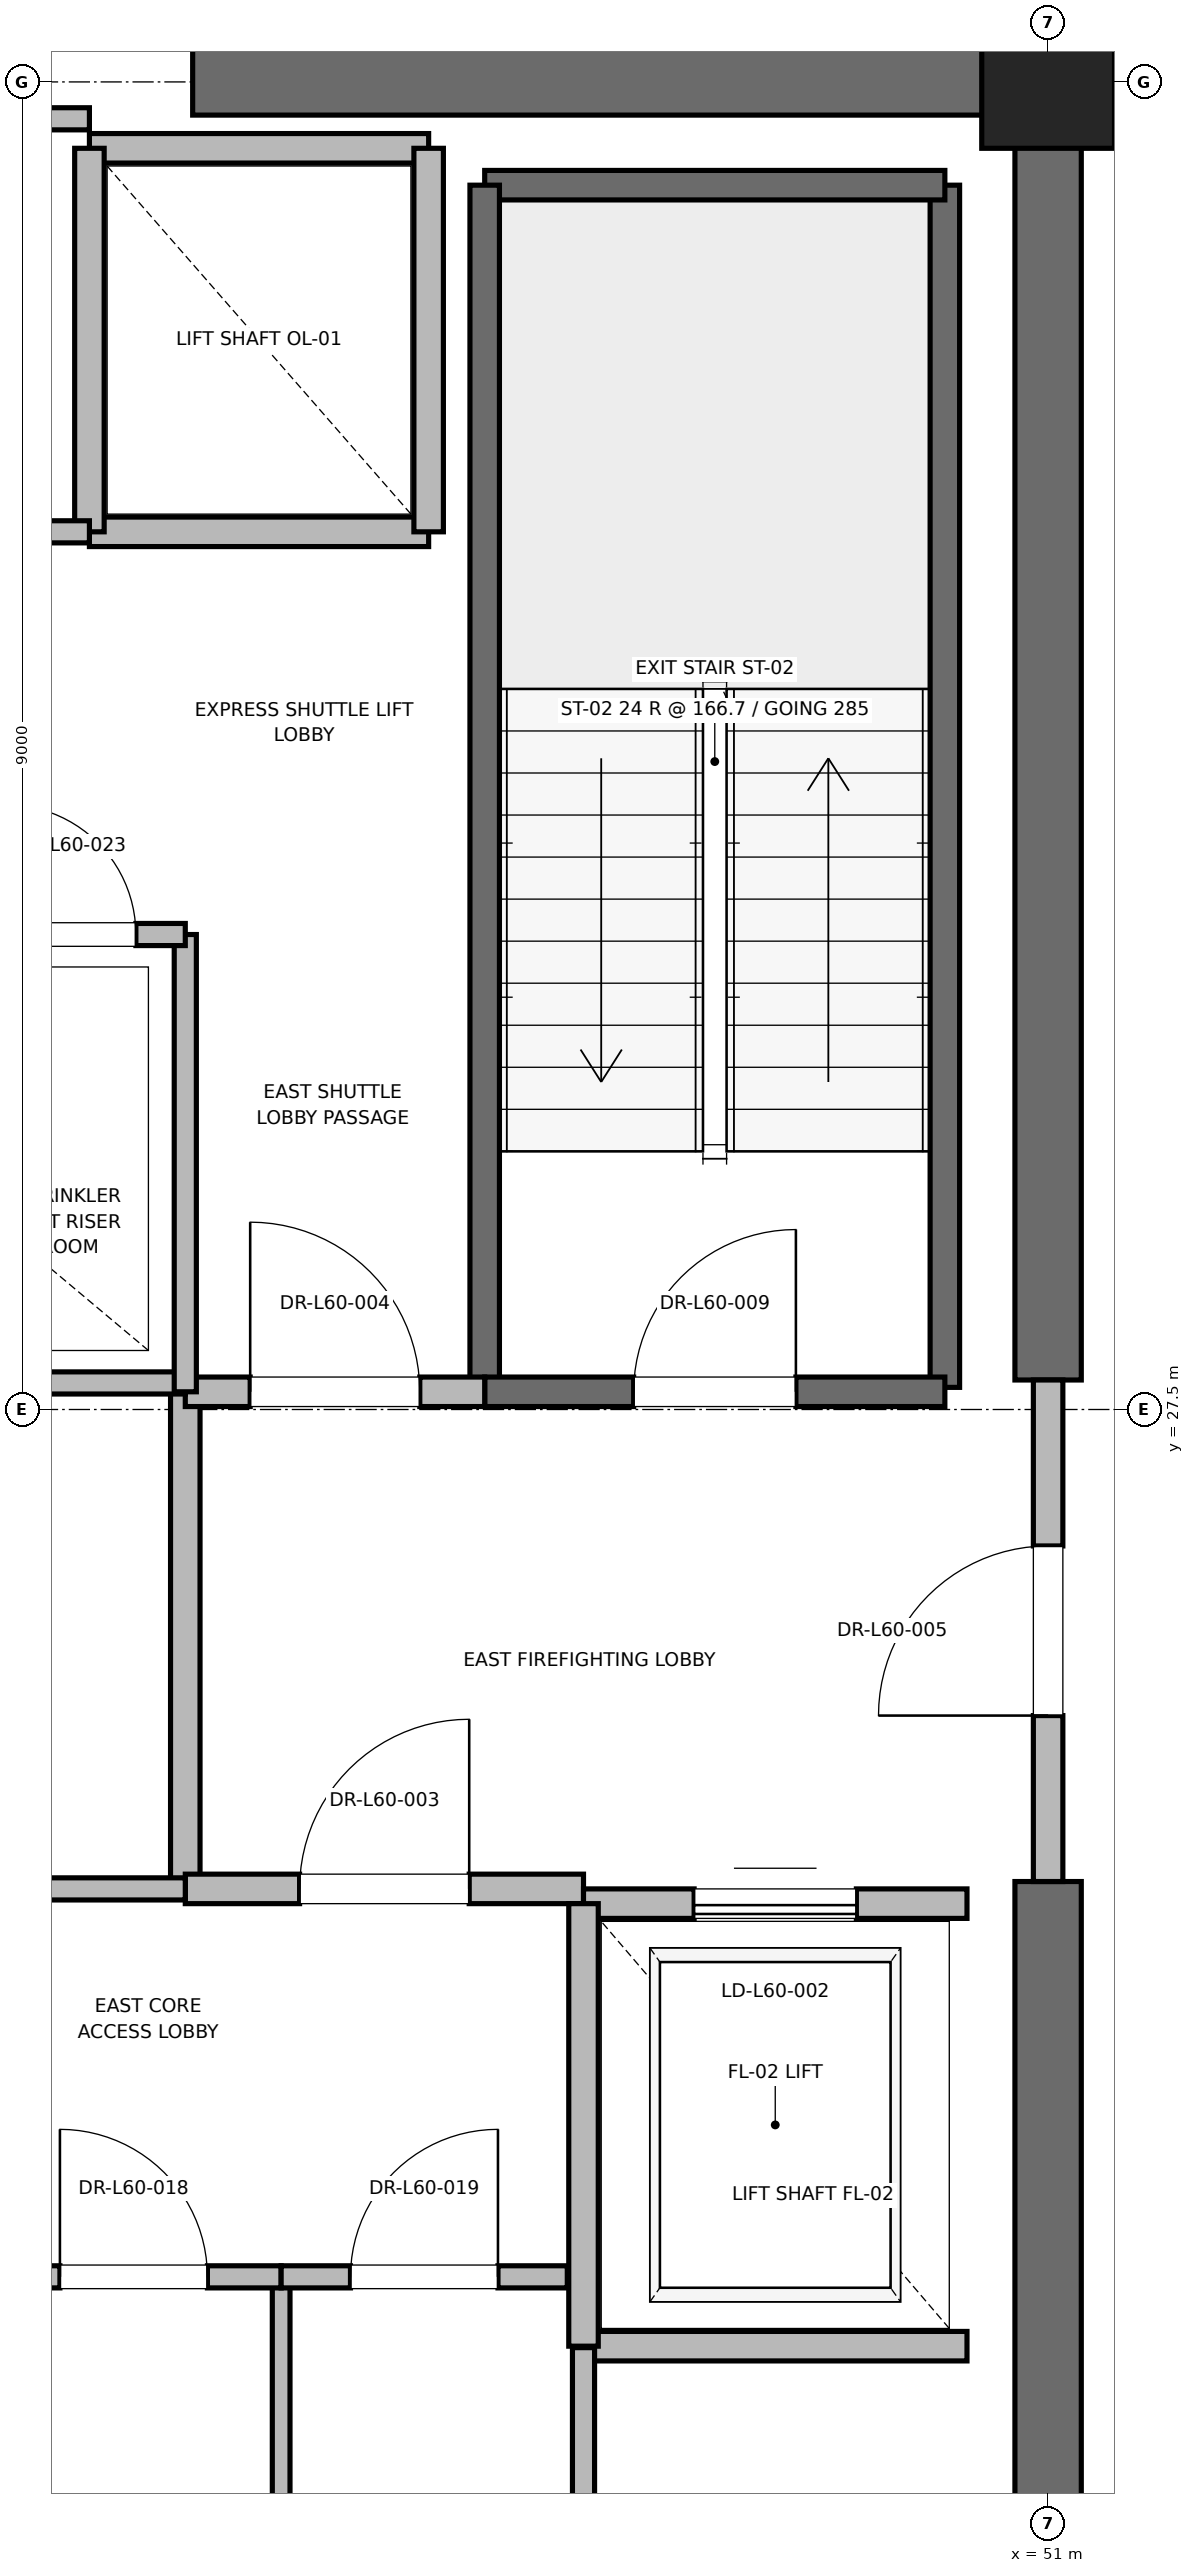
"""IFC4 building model, lengths in metres.
Left out: names, types, materials, properties, quantities, classifications, styles, units other than length and angle.
Written with IfcOpenShell. Run it as: python <this file> out.ifc"""

import sys

from ifc_helpers import new_model, si_unit, direction, frame, frame_2d, origin, origin_2d, place, context, subcontext, project, spatial, rectangle, extrude, element, fill, save


model = new_model("IFC4")
c1 = context("Model", 3, precision=1e-05, world=origin(), true_north=direction((0.0, 1.0)))
c2 = subcontext(c1, "Body", "Model", "MODEL_VIEW")
j1 = project(units=[si_unit("LENGTHUNIT", "METRE"), si_unit("PLANEANGLEUNIT", "RADIAN")], contexts=[c1])
p1 = place(None, origin())
s1 = spatial("IfcSite", under=j1, at=p1, CompositionType="ELEMENT")
p2 = place(p1, origin())
s2 = spatial("IfcBuilding", under=s1, at=p2, CompositionType="ELEMENT")
p3 = place(p2, frame((0.0, 0.0, 259.2)))
s3 = spatial("IfcBuildingStorey", under=s2, at=p3, CompositionType="ELEMENT", Elevation=259.2)
p4 = place(p3, frame((51.0, 36.5, 0.0), z_axis=(0.0, 0.0, 1.0), x_axis=(1.0, 0.0, 0.0)))
e1 = element("IfcColumn", 1, at=p4, inside=s3, PredefinedType="PILASTER", context=c2, shape_type="SweptSolid", body=[
    extrude(rectangle(XDim=0.9, YDim=0.9, at=origin_2d()), origin(), (0.0, 0.0, 1.0), 4.0),
])
for number, where, z_axis, x_axis in (
    (2, (45.2, 36.5, 0.0), (0.0, 0.0, 1.0), (1.0, 0.0, 0.0)),
    (3, (51.0, 18.5, 0.0), (0.0, 0.0, 1.0), (0.0, 1.0, 0.0)),
):
    element("IfcWall", number, at=place(p3, frame(where, z_axis=z_axis, x_axis=x_axis)), inside=s3, PredefinedType="SHEAR", context=c2, shape_type="SweptSolid", body=[
        extrude(rectangle(XDim=5.8, YDim=0.45, at=frame_2d((2.9, 0.0))), origin(), (0.0, 0.0, 1.0), 3.785),
    ])
p5 = place(p3, frame((51.0, 27.7, 0.0), z_axis=(0.0, 0.0, 1.0), x_axis=(0.0, 1.0, 0.0)))
e4 = element("IfcWall", 4, at=p5, inside=s3, PredefinedType="SHEAR", context=c2, shape_type="SweptSolid", body=[
    extrude(rectangle(XDim=8.8, YDim=0.45, at=frame_2d((4.4, 0.0))), origin(), (0.0, 0.0, 1.0), 3.785),
])
p6 = place(p3, frame((50.3, 27.65, 0.0), z_axis=(0.0, 0.0, 1.0), x_axis=(0.0, 1.0, 0.0)))
e5 = element("IfcWall", 5, at=p6, inside=s3, PredefinedType="SOLIDWALL", context=c2, shape_type="SweptSolid", body=[
    extrude(rectangle(XDim=8.15, YDim=0.2, at=frame_2d((4.075, 0.0))), origin(), (0.0, 0.0, 1.0), 3.785),
])
p7 = place(p3, frame((47.18, 35.8, 0.0), z_axis=(0.0, 0.0, 1.0), x_axis=(1.0, 0.0, 0.0)))
e6 = element("IfcWall", 6, at=p7, inside=s3, PredefinedType="SOLIDWALL", context=c2, shape_type="SweptSolid", body=[
    extrude(rectangle(XDim=3.12, YDim=0.2, at=frame_2d((1.56, 0.0))), origin(), (0.0, 0.0, 1.0), 3.785),
])
p8 = place(p3, frame((47.18, 27.62, 0.0), z_axis=(0.0, 0.0, 1.0), x_axis=(0.0, 1.0, 0.0)))
e7 = element("IfcWall", 7, at=p8, inside=s3, PredefinedType="SOLIDWALL", context=c2, shape_type="SweptSolid", body=[
    extrude(rectangle(XDim=8.18, YDim=0.2, at=frame_2d((4.09, 0.0))), origin(), (0.0, 0.0, 1.0), 3.785),
])
p9 = place(p3, frame((47.18, 27.62, 0.0), z_axis=(0.0, 0.0, 1.0), x_axis=(1.0, 0.0, 0.0)))
e8 = element("IfcWall", 8, at=p9, inside=s3, PredefinedType="SOLIDWALL", context=c2, shape_type="SweptSolid", body=[
    extrude(rectangle(XDim=3.12, YDim=0.2, at=frame_2d((1.56, 0.0))), origin(), (0.0, 0.0, 1.0), 3.785),
])
p10 = place(p9, frame((1.01, 0.0, 0.0)))
e9 = element("IfcOpeningElement", 9, at=p10, cuts=e8, PredefinedType="OPENING", context=c2, shape_type="SweptSolid", body=[
    extrude(rectangle(XDim=1.1, YDim=2.15, at=frame_2d((0.55, 1.075))), frame((0.0, 0.1, 0.0), z_axis=(0.0, -1.0, 0.0), x_axis=(1.0, 0.0, 0.0)), (0.0, 0.0, 1.0), 0.2),
])
p11 = place(p3, frame((45.15, 24.25, 0.0), z_axis=(0.0, 0.0, 1.0), x_axis=(0.0, 1.0, 0.0)))
e10 = element("IfcWall", 10, at=p11, inside=s3, PredefinedType="PARTITIONING", context=c2, shape_type="SweptSolid", body=[
    extrude(rectangle(XDim=3.37, YDim=0.2, at=frame_2d((1.685, 0.0))), origin(), (0.0, 0.0, 1.0), 3.785),
])
p12 = place(p3, frame((45.15, 24.25, 0.0), z_axis=(0.0, 0.0, 1.0), x_axis=(1.0, 0.0, 0.0)))
e11 = element("IfcWall", 11, at=p12, inside=s3, PredefinedType="PARTITIONING", context=c2, shape_type="SweptSolid", body=[
    extrude(rectangle(XDim=2.7, YDim=0.2, at=frame_2d((1.35, 0.0))), origin(), (0.0, 0.0, 1.0), 3.785),
])
p13 = place(p12, frame((0.775, 0.0, 0.0)))
e12 = element("IfcOpeningElement", 12, at=p13, cuts=e11, PredefinedType="OPENING", context=c2, shape_type="SweptSolid", body=[
    extrude(rectangle(XDim=1.15, YDim=2.2, at=frame_2d((0.575, 1.1))), frame((0.0, 0.1, 0.0), z_axis=(0.0, -1.0, 0.0), x_axis=(1.0, 0.0, 0.0)), (0.0, 0.0, 1.0), 0.2),
])
p14 = place(p3, frame((45.15, 27.62, 0.0), z_axis=(0.0, 0.0, 1.0), x_axis=(1.0, 0.0, 0.0)))
e13 = element("IfcWall", 13, at=p14, inside=s3, PredefinedType="PARTITIONING", context=c2, shape_type="SweptSolid", body=[
    extrude(rectangle(XDim=2.03, YDim=0.2, at=frame_2d((1.015, 0.0))), origin(), (0.0, 0.0, 1.0), 3.785),
])
p15 = place(p14, frame((0.44, 0.0, 0.0)))
e14 = element("IfcOpeningElement", 14, at=p15, cuts=e13, PredefinedType="OPENING", context=c2, shape_type="SweptSolid", body=[
    extrude(rectangle(XDim=1.15, YDim=2.2, at=frame_2d((0.575, 1.1))), frame((0.0, 0.1, 0.0), z_axis=(0.0, -1.0, 0.0), x_axis=(1.0, 0.0, 0.0)), (0.0, 0.0, 1.0), 0.2),
])
p16 = place(p3, frame((51.0, 24.3, 0.0), z_axis=(0.0, 0.0, 1.0), x_axis=(0.0, 1.0, 0.0)))
e15 = element("IfcWall", 15, at=p16, inside=s3, PredefinedType="PARTITIONING", context=c2, shape_type="SweptSolid", body=[
    extrude(rectangle(XDim=3.4, YDim=0.2, at=frame_2d((1.7, 0.0))), origin(), (0.0, 0.0, 1.0), 2.865),
])
p17 = place(p16, frame((1.125, 0.0, 0.0)))
e16 = element("IfcOpeningElement", 16, at=p17, cuts=e15, PredefinedType="OPENING", context=c2, shape_type="SweptSolid", body=[
    extrude(rectangle(XDim=1.15, YDim=2.2, at=frame_2d((0.575, 1.1))), frame((0.0, 0.1, 0.0), z_axis=(0.0, -1.0, 0.0), x_axis=(1.0, 0.0, 0.0)), (0.0, 0.0, 1.0), 0.2),
])
p18 = place(p3, frame((47.85, 21.15, 0.0), z_axis=(0.0, 0.0, 1.0), x_axis=(1.0, 0.0, 0.0)))
e17 = element("IfcWall", 17, at=p18, inside=s3, PredefinedType="SOLIDWALL", context=c2, shape_type="SweptSolid", body=[
    extrude(rectangle(XDim=2.6, YDim=0.2, at=frame_2d((1.3, 0.0))), origin(), (0.0, 0.0, 1.0), 3.785),
])
p19 = place(p3, frame((50.45, 24.15, 0.0), z_axis=(0.0, 0.0, 1.0), x_axis=(-1.0, 0.0, 0.0)))
e18 = element("IfcWall", 18, at=p19, inside=s3, PredefinedType="SOLIDWALL", context=c2, shape_type="SweptSolid", body=[
    extrude(rectangle(XDim=2.6, YDim=0.2, at=frame_2d((1.3, 0.0))), origin(), (0.0, 0.0, 1.0), 2.865),
])
p20 = place(p19, frame((0.75, 0.0, 0.0)))
e19 = element("IfcOpeningElement", 19, at=p20, cuts=e18, PredefinedType="OPENING", context=c2, shape_type="SweptSolid", body=[
    extrude(rectangle(XDim=1.1, YDim=2.2, at=frame_2d((0.55, 1.1))), frame((0.0, 0.1, 0.0), z_axis=(0.0, -1.0, 0.0), x_axis=(1.0, 0.0, 0.0)), (0.0, 0.0, 1.0), 0.2),
])
p21 = place(p3, frame((47.85, 24.15, 0.0), z_axis=(0.0, 0.0, 1.0), x_axis=(0.0, -1.0, 0.0)))
e20 = element("IfcWall", 20, at=p21, inside=s3, PredefinedType="SOLIDWALL", context=c2, shape_type="SweptSolid", body=[
    extrude(rectangle(XDim=3.0, YDim=0.2, at=frame_2d((1.5, 0.0))), origin(), (0.0, 0.0, 1.0), 3.785),
])
p22 = place(p3, frame((44.5, 33.45, 0.0), z_axis=(0.0, 0.0, 1.0), x_axis=(1.0, 0.0, 0.0)))
e21 = element("IfcWall", 21, at=p22, inside=s3, PredefinedType="SOLIDWALL", context=c2, shape_type="SweptSolid", body=[
    extrude(rectangle(XDim=2.3, YDim=0.2, at=frame_2d((1.15, 0.0))), origin(), (0.0, 0.0, 1.0), 3.785),
])
p23 = place(p3, frame((46.8, 36.05, 0.0), z_axis=(0.0, 0.0, 1.0), x_axis=(-1.0, 0.0, 0.0)))
e22 = element("IfcWall", 22, at=p23, inside=s3, PredefinedType="SOLIDWALL", context=c2, shape_type="SweptSolid", body=[
    extrude(rectangle(XDim=2.3, YDim=0.2, at=frame_2d((1.15, 0.0))), origin(), (0.0, 0.0, 1.0), 2.865),
])
p24 = place(p3, frame((44.5, 36.05, 0.0), z_axis=(0.0, 0.0, 1.0), x_axis=(0.0, -1.0, 0.0)))
e23 = element("IfcWall", 23, at=p24, inside=s3, PredefinedType="SOLIDWALL", context=c2, shape_type="SweptSolid", body=[
    extrude(rectangle(XDim=2.6, YDim=0.2, at=frame_2d((1.3, 0.0))), origin(), (0.0, 0.0, 1.0), 2.865),
])
p25 = place(p3, frame((46.8, 33.45, 0.0), z_axis=(0.0, 0.0, 1.0), x_axis=(0.0, 1.0, 0.0)))
e24 = element("IfcWall", 24, at=p25, inside=s3, PredefinedType="SOLIDWALL", context=c2, shape_type="SweptSolid", body=[
    extrude(rectangle(XDim=2.6, YDim=0.2, at=frame_2d((1.3, 0.0))), origin(), (0.0, 0.0, 1.0), 3.785),
])
p26 = place(p3, frame((41.56, 27.68, 0.0), z_axis=(0.0, 0.0, 1.0), x_axis=(1.0, 0.0, 0.0)))
e25 = element("IfcWall", 25, at=p26, inside=s3, PredefinedType="PARTITIONING", context=c2, shape_type="SweptSolid", body=[
    extrude(rectangle(XDim=3.59, YDim=0.15, at=frame_2d((1.795, 0.0))), origin(), (0.0, 0.0, 1.0), 2.85),
])
p27 = place(p3, frame((47.85, 18.6, 0.0), z_axis=(0.0, 0.0, 1.0), x_axis=(0.0, 1.0, 0.0)))
e26 = element("IfcWall", 26, at=p27, inside=s3, PredefinedType="PARTITIONING", context=c2, shape_type="SweptSolid", body=[
    extrude(rectangle(XDim=2.54, YDim=0.15, at=frame_2d((1.27, 0.0))), origin(), (0.0, 0.0, 1.0), 2.85),
])
p28 = place(p3, frame((45.8, 18.6, 0.0), z_axis=(0.0, 0.0, 1.0), x_axis=(0.0, 1.0, 0.0)))
e27 = element("IfcWall", 27, at=p28, inside=s3, PredefinedType="PARTITIONING", context=c2, shape_type="SweptSolid", body=[
    extrude(rectangle(XDim=3.02, YDim=0.12, at=frame_2d((1.51, 0.0))), origin(), (0.0, 0.0, 1.0), 2.85),
])
p29 = place(p3, frame((43.8, 21.62, 0.0), z_axis=(0.0, 0.0, 1.0), x_axis=(1.0, 0.0, 0.0)))
e28 = element("IfcWall", 28, at=p29, inside=s3, PredefinedType="PARTITIONING", context=c2, shape_type="SweptSolid", body=[
    extrude(rectangle(XDim=2.0, YDim=0.15, at=frame_2d((1.0, 0.0))), origin(), (0.0, 0.0, 1.0), 2.85),
])
p30 = place(p29, frame((0.5, 0.0, 0.0)))
e29 = element("IfcOpeningElement", 29, at=p30, cuts=e28, PredefinedType="OPENING", context=c2, shape_type="SweptSolid", body=[
    extrude(rectangle(XDim=1.0, YDim=2.15, at=frame_2d((0.5, 1.075))), frame((0.0, 0.075, 0.0), z_axis=(0.0, -1.0, 0.0), x_axis=(1.0, 0.0, 0.0)), (0.0, 0.0, 1.0), 0.15),
])
p31 = place(p3, frame((45.8, 21.62, 0.0), z_axis=(0.0, 0.0, 1.0), x_axis=(1.0, 0.0, 0.0)))
e30 = element("IfcWall", 30, at=p31, inside=s3, PredefinedType="PARTITIONING", context=c2, shape_type="SweptSolid", body=[
    extrude(rectangle(XDim=1.94, YDim=0.15, at=frame_2d((0.97, 0.0))), origin(), (0.0, 0.0, 1.0), 2.85),
])
p32 = place(p31, frame((0.47, 0.0, 0.0)))
e31 = element("IfcOpeningElement", 31, at=p32, cuts=e30, PredefinedType="OPENING", context=c2, shape_type="SweptSolid", body=[
    extrude(rectangle(XDim=1.0, YDim=2.15, at=frame_2d((0.5, 1.075))), frame((0.0, 0.075, 0.0), z_axis=(0.0, -1.0, 0.0), x_axis=(1.0, 0.0, 0.0)), (0.0, 0.0, 1.0), 0.15),
])
p33 = place(p3, frame((41.76, 24.25, 0.0), z_axis=(0.0, 0.0, 1.0), x_axis=(1.0, 0.0, 0.0)))
e32 = element("IfcWall", 32, at=p33, inside=s3, PredefinedType="PARTITIONING", context=c2, shape_type="SweptSolid", body=[
    extrude(rectangle(XDim=3.39, YDim=0.15, at=frame_2d((1.695, 0.0))), origin(), (0.0, 0.0, 1.0), 2.85),
])
p34 = place(p33, frame((1.255, 0.0, 0.0)))
e33 = element("IfcOpeningElement", 33, at=p34, cuts=e32, PredefinedType="OPENING", context=c2, shape_type="SweptSolid", body=[
    extrude(rectangle(XDim=0.88, YDim=2.1, at=frame_2d((0.44, 1.05))), frame((0.0, 0.075, 0.0), z_axis=(0.0, -1.0, 0.0), x_axis=(1.0, 0.0, 0.0)), (0.0, 0.0, 1.0), 0.15),
])
p35 = place(p3, frame((45.15, 27.62, 0.0), z_axis=(0.0, 0.0, 1.0), x_axis=(0.0, 1.0, 0.0)))
e34 = element("IfcWall", 34, at=p35, inside=s3, PredefinedType="PARTITIONING", context=c2, shape_type="SweptSolid", body=[
    extrude(rectangle(XDim=3.1, YDim=0.15, at=frame_2d((1.55, 0.0))), origin(), (0.0, 0.0, 1.0), 2.85),
])
p36 = place(p3, frame((43.6, 30.72, 0.0), z_axis=(0.0, 0.0, 1.0), x_axis=(1.0, 0.0, 0.0)))
e35 = element("IfcWall", 35, at=p36, inside=s3, PredefinedType="PARTITIONING", context=c2, shape_type="SweptSolid", body=[
    extrude(rectangle(XDim=1.55, YDim=0.15, at=frame_2d((0.775, 0.0))), origin(), (0.0, 0.0, 1.0), 2.85),
])
p37 = place(p36, frame((0.335, 0.0, 0.0)))
e36 = element("IfcOpeningElement", 36, at=p37, cuts=e35, PredefinedType="OPENING", context=c2, shape_type="SweptSolid", body=[
    extrude(rectangle(XDim=0.88, YDim=2.1, at=frame_2d((0.44, 1.05))), frame((0.0, 0.075, 0.0), z_axis=(0.0, -1.0, 0.0), x_axis=(1.0, 0.0, 0.0)), (0.0, 0.0, 1.0), 0.15),
])
p38 = place(p3, frame((41.56, 36.25, 0.0), z_axis=(0.0, 0.0, 1.0), x_axis=(1.0, 0.0, 0.0)))
e37 = element("IfcWall", 37, at=p38, inside=s3, PredefinedType="PARTITIONING", context=c2, shape_type="SweptSolid", body=[
    extrude(rectangle(XDim=2.94, YDim=0.15, at=frame_2d((1.47, 0.0))), origin(), (0.0, 0.0, 1.0), 2.85),
])
p39 = place(p3, frame((41.56, 33.45, 0.0), z_axis=(0.0, 0.0, 1.0), x_axis=(1.0, 0.0, 0.0)))
e38 = element("IfcWall", 38, at=p39, inside=s3, PredefinedType="PARTITIONING", context=c2, shape_type="SweptSolid", body=[
    extrude(rectangle(XDim=2.94, YDim=0.15, at=frame_2d((1.47, 0.0))), origin(), (0.0, 0.0, 1.0), 2.85),
])
p40 = place(p39, frame((1.03, 0.0, 0.0)))
e39 = element("IfcOpeningElement", 39, at=p40, cuts=e38, PredefinedType="OPENING", context=c2, shape_type="SweptSolid", body=[
    extrude(rectangle(XDim=0.88, YDim=2.1, at=frame_2d((0.44, 1.05))), frame((0.0, 0.075, 0.0), z_axis=(0.0, -1.0, 0.0), x_axis=(1.0, 0.0, 0.0)), (0.0, 0.0, 1.0), 0.15),
])
p41 = place(p10, origin())
e40 = element("IfcDoor", 40, at=p41, inside=s3, OperationType="SINGLE_SWING_RIGHT", PredefinedType="DOOR", context=c2, shape_type="SweptSolid", body=[
    extrude(rectangle(XDim=1.1, YDim=2.15, at=frame_2d((0.55, 1.075))), frame((0.0, 0.025, 0.0), z_axis=(0.0, -1.0, 0.0), x_axis=(1.0, 0.0, 0.0)), (0.0, 0.0, 1.0), 0.05),
])
fill(e9, e40)
p42 = place(p13, origin())
e41 = element("IfcDoor", 41, at=p42, inside=s3, OperationType="SINGLE_SWING_RIGHT", PredefinedType="DOOR", context=c2, shape_type="SweptSolid", body=[
    extrude(rectangle(XDim=1.15, YDim=2.2, at=frame_2d((0.575, 1.1))), frame((0.0, 0.025, 0.0), z_axis=(0.0, -1.0, 0.0), x_axis=(1.0, 0.0, 0.0)), (0.0, 0.0, 1.0), 0.05),
])
fill(e12, e41)
p43 = place(p15, origin())
e42 = element("IfcDoor", 42, at=p43, inside=s3, OperationType="SINGLE_SWING_LEFT", PredefinedType="DOOR", context=c2, shape_type="SweptSolid", body=[
    extrude(rectangle(XDim=1.15, YDim=2.2, at=frame_2d((0.575, 1.1))), frame((0.0, 0.025, 0.0), z_axis=(0.0, -1.0, 0.0), x_axis=(1.0, 0.0, 0.0)), (0.0, 0.0, 1.0), 0.05),
])
fill(e14, e42)
p44 = place(p17, origin())
e43 = element("IfcDoor", 43, at=p44, inside=s3, OperationType="SINGLE_SWING_LEFT", PredefinedType="DOOR", context=c2, shape_type="SweptSolid", body=[
    extrude(rectangle(XDim=1.15, YDim=2.2, at=frame_2d((0.575, 1.1))), frame((0.0, 0.025, 0.0), z_axis=(0.0, -1.0, 0.0), x_axis=(1.0, 0.0, 0.0)), (0.0, 0.0, 1.0), 0.05),
])
fill(e16, e43)
p45 = place(p20, origin())
e44 = element("IfcDoor", 44, at=p45, inside=s3, OperationType="SLIDING_TO_RIGHT", PredefinedType="DOOR", context=c2, shape_type="SweptSolid", body=[
    extrude(rectangle(XDim=1.1, YDim=2.2, at=frame_2d((0.55, 1.1))), frame((0.0, 0.025, 0.0), z_axis=(0.0, -1.0, 0.0), x_axis=(1.0, 0.0, 0.0)), (0.0, 0.0, 1.0), 0.05),
])
fill(e19, e44)
p46 = place(p30, origin())
e45 = element("IfcDoor", 45, at=p46, inside=s3, OperationType="SINGLE_SWING_LEFT", PredefinedType="DOOR", context=c2, shape_type="SweptSolid", body=[
    extrude(rectangle(XDim=1.0, YDim=2.15, at=frame_2d((0.5, 1.075))), frame((0.0, 0.025, 0.0), z_axis=(0.0, -1.0, 0.0), x_axis=(1.0, 0.0, 0.0)), (0.0, 0.0, 1.0), 0.05),
])
fill(e29, e45)
p47 = place(p32, origin())
e46 = element("IfcDoor", 46, at=p47, inside=s3, OperationType="SINGLE_SWING_RIGHT", PredefinedType="DOOR", context=c2, shape_type="SweptSolid", body=[
    extrude(rectangle(XDim=1.0, YDim=2.15, at=frame_2d((0.5, 1.075))), frame((0.0, 0.025, 0.0), z_axis=(0.0, -1.0, 0.0), x_axis=(1.0, 0.0, 0.0)), (0.0, 0.0, 1.0), 0.05),
])
fill(e31, e46)
p48 = place(p37, origin())
e47 = element("IfcDoor", 47, at=p48, inside=s3, OperationType="SINGLE_SWING_LEFT", PredefinedType="DOOR", context=c2, shape_type="SweptSolid", body=[
    extrude(rectangle(XDim=0.88, YDim=2.1, at=frame_2d((0.44, 1.05))), frame((0.0, 0.025, 0.0), z_axis=(0.0, -1.0, 0.0), x_axis=(1.0, 0.0, 0.0)), (0.0, 0.0, 1.0), 0.05),
])
fill(e36, e47)
save(model, sys.argv[1])
